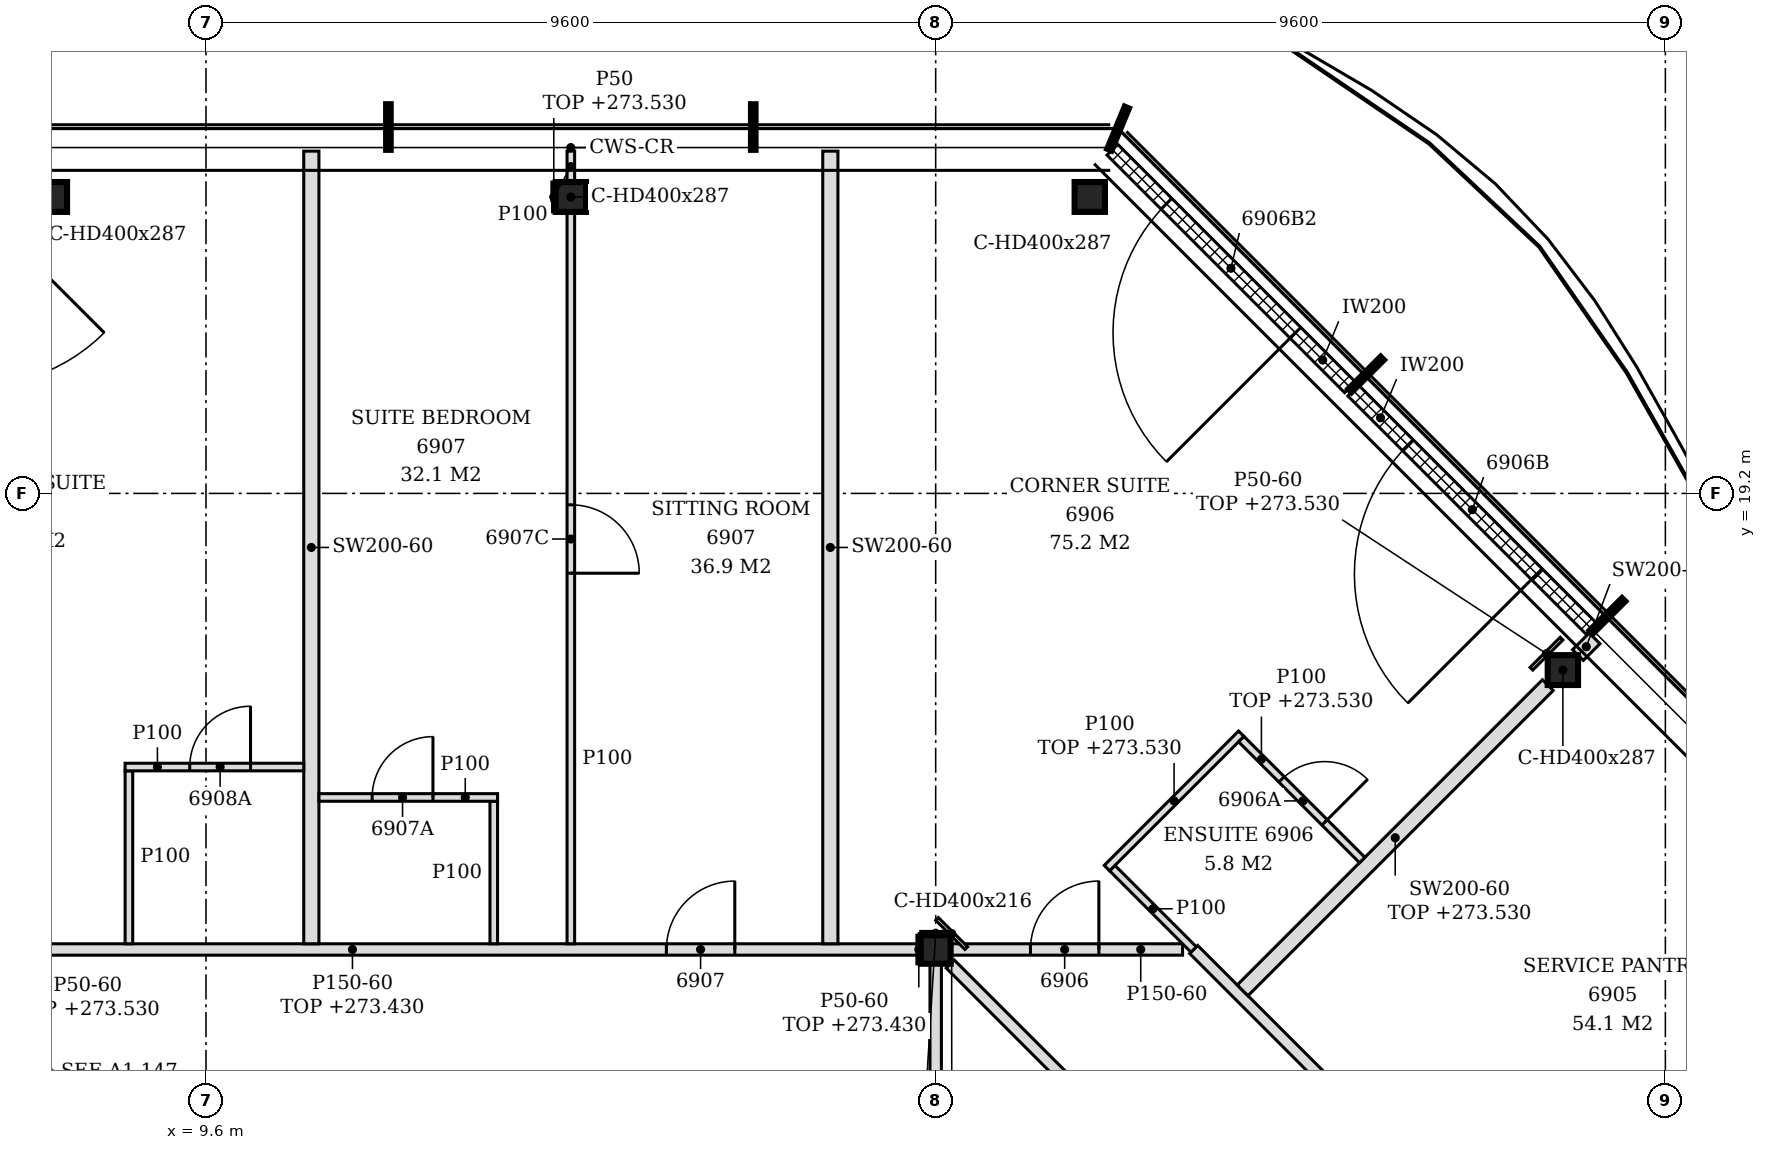
"""IFC4 building model, lengths in metres.
Left out: names, types, materials, properties, quantities, classifications, styles, units other than length and angle.
Written with IfcOpenShell. Run it as: python <this file> out.ifc"""

import sys

from ifc_helpers import new_model, si_unit, direction, frame, frame_2d, origin, origin_2d, place, context, subcontext, project, spatial, polyline, rectangle, i_section, outline, extrude, element, fill, save


model = new_model("IFC4")
c1 = context("Model", 3, precision=1e-05, world=origin(), true_north=direction((0.0, 1.0)))
c2 = subcontext(c1, "Body", "Model", "MODEL_VIEW")
j1 = project(units=[si_unit("LENGTHUNIT", "METRE"), si_unit("PLANEANGLEUNIT", "RADIAN")], contexts=[c1])
p1 = place(None, origin())
s1 = spatial("IfcSite", under=j1, at=p1, CompositionType="ELEMENT")
p2 = place(p1, origin())
s2 = spatial("IfcBuilding", under=s1, at=p2, CompositionType="ELEMENT")
p3 = place(p2, frame((0.0, 0.0, 270.6)))
s3 = spatial("IfcBuildingStorey", under=s2, at=p3, CompositionType="ELEMENT", Elevation=270.6)
for number, where, z_axis, x_axis in (
    (1, (27.451, 16.876, -0.15), (0.0, 0.0, 1.0), (1.0, 0.0, 0.0)),
    (2, (21.227, 23.1, -0.15), (0.0, 0.0, 1.0), (1.0, 0.0, 0.0)),
    (3, (14.4, 23.1, -0.15), (0.0, 0.0, 1.0), (1.0, 0.0, 0.0)),
    (4, (7.573, 23.1, -0.15), (0.0, 0.0, 1.0), (1.0, 0.0, 0.0)),
):
    element("IfcColumn", number, at=place(p3, frame(where, z_axis=z_axis, x_axis=x_axis)), inside=s3, PredefinedType="COLUMN", context=c2, shape_type="SweptSolid", body=[
        extrude(i_section(OverallWidth=0.399, OverallDepth=0.393, WebThickness=0.023, FlangeThickness=0.037, FilletRadius=0.015, at=origin_2d()), origin(), (0.0, 0.0, 1.0), 3.6),
    ])
p4 = place(p3, frame((19.2, 13.2, -0.15), z_axis=(0.0, 0.0, 1.0), x_axis=(1.0, 0.0, 0.0)))
e5 = element("IfcColumn", 5, at=p4, inside=s3, PredefinedType="COLUMN", context=c2, shape_type="SweptSolid", body=[
    extrude(i_section(OverallWidth=0.394, OverallDepth=0.375, WebThickness=0.017, FlangeThickness=0.028, FilletRadius=0.015, at=origin_2d()), origin(), (0.0, 0.0, 1.0), 3.6),
])
p5 = place(p3, frame((27.826, 17.42, 0.0), z_axis=(0.0, 0.0, 1.0), x_axis=(-0.707079231393, 0.707134329907, 0.0)))
e6 = element("IfcWall", 6, at=p5, inside=s3, PredefinedType="NOTDEFINED", context=c2, shape_type="SweptSolid", body=[
    extrude(rectangle(XDim=4.431, YDim=0.2, at=frame_2d((2.215, 0.0))), origin(), (0.0, 0.0, 1.0), 3.45),
])
p6 = place(p5, frame((1.015, 0.0, 0.0)))
e7 = element("IfcOpeningElement", 7, at=p6, cuts=e6, PredefinedType="OPENING", context=c2, shape_type="SweptSolid", body=[
    extrude(rectangle(XDim=2.4, YDim=2.4, at=frame_2d((1.2, 1.2))), frame((0.0, 0.11, 0.0), z_axis=(0.0, -1.0, 0.0), x_axis=(1.0, 0.0, 0.0)), (0.0, 0.0, 1.0), 0.22),
])
p7 = place(p3, frame((24.651, 20.596, 0.0), z_axis=(0.0, 0.0, 1.0), x_axis=(-0.707134392299, 0.707079168996, 0.0)))
e8 = element("IfcWall", 8, at=p7, inside=s3, PredefinedType="NOTDEFINED", context=c2, shape_type="SweptSolid", body=[
    extrude(rectangle(XDim=4.421, YDim=0.2, at=frame_2d((2.21, 0.0))), origin(), (0.0, 0.0, 1.0), 3.45),
])
p8 = place(p7, frame((1.015, 0.0, 0.0)))
e9 = element("IfcOpeningElement", 9, at=p8, cuts=e8, PredefinedType="OPENING", context=c2, shape_type="SweptSolid", body=[
    extrude(rectangle(XDim=2.4, YDim=2.4, at=frame_2d((1.2, 1.2))), frame((0.0, 0.11, 0.0), z_axis=(0.0, -1.0, 0.0), x_axis=(1.0, 0.0, 0.0)), (0.0, 0.0, 1.0), 0.22),
])
p9 = place(p3, frame((32.272, 0.128, 0.0), z_axis=(0.0, 0.0, 1.0), x_axis=(-0.707106781187, 0.707106781187, 0.0)))
e10 = element("IfcWall", 10, at=p9, inside=s3, PredefinedType="PARTITIONING", context=c2, shape_type="SweptSolid", body=[
    extrude(rectangle(XDim=18.215, YDim=0.15, at=frame_2d((9.107, 0.0))), origin(), (0.0, 0.0, 1.0), 2.88),
])
p10 = place(p9, frame((8.703, 0.0, 0.0)))
e11 = element("IfcOpeningElement", 11, at=p10, cuts=e10, PredefinedType="OPENING", context=c2, shape_type="SweptSolid", body=[
    extrude(rectangle(XDim=0.9, YDim=2.1, at=frame_2d((0.45, 1.05))), frame((0.0, 0.085, 0.0), z_axis=(0.0, -1.0, 0.0), x_axis=(1.0, 0.0, 0.0)), (0.0, 0.0, 1.0), 0.17),
])
p11 = place(p3, frame((34.672, 1.122, 0.0), z_axis=(0.0, 0.0, 1.0), x_axis=(-0.707113927758, 0.707099634543, 0.0)))
e12 = element("IfcWall", 12, at=p11, inside=s3, PredefinedType="PARTITIONING", context=c2, shape_type="SweptSolid", body=[
    extrude(rectangle(XDim=17.081, YDim=0.15, at=frame_2d((8.541, 0.0))), origin(), (0.0, 0.0, 1.0), 2.88),
])
p12 = place(p11, frame((5.454, 0.0, 0.0)))
e13 = element("IfcOpeningElement", 13, at=p12, cuts=e12, PredefinedType="OPENING", context=c2, shape_type="SweptSolid", body=[
    extrude(rectangle(XDim=0.9, YDim=2.1, at=frame_2d((0.45, 1.05))), frame((0.0, 0.085, 0.0), z_axis=(0.0, -1.0, 0.0), x_axis=(1.0, 0.0, 0.0)), (0.0, 0.0, 1.0), 0.17),
])
p13 = place(p11, frame((11.897, 0.0, 0.0)))
e14 = element("IfcOpeningElement", 14, at=p13, cuts=e12, PredefinedType="OPENING", context=c2, shape_type="SweptSolid", body=[
    extrude(rectangle(XDim=0.9, YDim=2.1, at=frame_2d((0.45, 1.05))), frame((0.0, 0.085, 0.0), z_axis=(0.0, -1.0, 0.0), x_axis=(1.0, 0.0, 0.0)), (0.0, 0.0, 1.0), 0.17),
])
p14 = place(p3, frame((19.2, 2.587, 0.0), z_axis=(0.0, 0.0, 1.0), x_axis=(0.0, 1.0, 0.0)))
e15 = element("IfcWall", 15, at=p14, inside=s3, PredefinedType="PARTITIONING", context=c2, shape_type="SweptSolid", body=[
    extrude(rectangle(XDim=10.425, YDim=0.15, at=frame_2d((5.212, 0.0))), origin(), (0.0, 0.0, 1.0), 2.83),
])
p15 = place(p3, frame((23.238, 12.662, 0.0), z_axis=(0.0, 0.0, 1.0), x_axis=(0.707128276734, 0.707085284986, 0.0)))
e16 = element("IfcWall", 16, at=p15, inside=s3, PredefinedType="PARTITIONING", context=c2, shape_type="SweptSolid", body=[
    extrude(rectangle(XDim=5.679, YDim=0.2, at=frame_2d((2.839, 0.0))), origin(), (0.0, 0.0, 1.0), 2.93),
])
p16 = place(p3, frame((7.397, 13.2, 0.0), z_axis=(0.0, 0.0, 1.0), x_axis=(1.0, 0.0, 0.0)))
e17 = element("IfcWall", 17, at=p16, inside=s3, PredefinedType="PARTITIONING", context=c2, shape_type="SweptSolid", body=[
    extrude(rectangle(XDim=11.606, YDim=0.15, at=frame_2d((5.803, 0.0))), origin(), (0.0, 0.0, 1.0), 2.83),
])
p17 = place(p16, frame((8.26, 0.0, 0.0)))
e18 = element("IfcOpeningElement", 18, at=p17, cuts=e17, PredefinedType="OPENING", context=c2, shape_type="SweptSolid", body=[
    extrude(rectangle(XDim=0.9, YDim=2.1, at=frame_2d((0.45, 1.05))), frame((0.0, 0.085, 0.0), z_axis=(0.0, -1.0, 0.0), x_axis=(1.0, 0.0, 0.0)), (0.0, 0.0, 1.0), 0.17),
])
p18 = place(p3, frame((19.397, 13.2, 0.0), z_axis=(0.0, 0.0, 1.0), x_axis=(1.0, 0.0, 0.0)))
e19 = element("IfcWall", 19, at=p18, inside=s3, PredefinedType="PARTITIONING", context=c2, shape_type="SweptSolid", body=[
    extrude(rectangle(XDim=3.051, YDim=0.15, at=frame_2d((1.526, 0.0))), origin(), (0.0, 0.0, 1.0), 3.45),
])
p19 = place(p18, frame((1.05, 0.0, 0.0)))
e20 = element("IfcOpeningElement", 20, at=p19, cuts=e19, PredefinedType="OPENING", context=c2, shape_type="SweptSolid", body=[
    extrude(rectangle(XDim=0.9, YDim=2.1, at=frame_2d((0.45, 1.05))), frame((0.0, 0.085, 0.0), z_axis=(0.0, -1.0, 0.0), x_axis=(1.0, 0.0, 0.0)), (0.0, 0.0, 1.0), 0.17),
])
p20 = place(p3, frame((22.594, 13.2, 0.0), z_axis=(0.0, 0.0, 1.0), x_axis=(-0.707106781187, 0.707106781187, 0.0)))
e21 = element("IfcWall", 21, at=p20, inside=s3, PredefinedType="PARTITIONING", context=c2, shape_type="SweptSolid", body=[
    extrude(rectangle(XDim=1.514, YDim=0.1, at=frame_2d((0.757, 0.0))), origin(), (0.0, 0.0, 1.0), 3.45),
])
p21 = place(p3, frame((8.586, 13.275, 0.0), z_axis=(0.0, 0.0, 1.0), x_axis=(0.0, 1.0, 0.0)))
e22 = element("IfcWall", 22, at=p21, inside=s3, PredefinedType="PARTITIONING", context=c2, shape_type="SweptSolid", body=[
    extrude(outline(polyline([(0.0, 0.0), (2.275, 0.0), (2.275, 3.45), (0.075, 3.45), (0.073, 2.83), (0.0, 2.83), (0.0, 0.0)])), frame((0.0, 0.05, 0.0), z_axis=(0.0, -1.0, 0.0), x_axis=(1.0, 0.0, 0.0)), (0.0, 0.0, 1.0), 0.1),
])
p22 = place(p3, frame((10.986, 13.275, 0.0), z_axis=(0.0, 0.0, 1.0), x_axis=(0.0, 1.0, 0.0)))
e23 = element("IfcWall", 23, at=p22, inside=s3, PredefinedType="PARTITIONING", context=c2, shape_type="SweptSolid", body=[
    extrude(outline(polyline([(0.0, 0.0), (10.428, 0.0), (10.428, 3.45), (9.975, 3.45), (9.973, 2.93), (9.675, 2.93), (9.673, 3.45), (6.03, 3.45), (6.028, 2.88), (5.82, 2.88), (5.818, 3.45), (0.075, 3.45), (0.073, 2.83), (0.0, 2.83), (0.0, 0.0)])), frame((0.0, 0.1, 0.0), z_axis=(0.0, -1.0, 0.0), x_axis=(1.0, 0.0, 0.0)), (0.0, 0.0, 1.0), 0.2),
])
p23 = place(p3, frame((13.386, 13.275, 0.0), z_axis=(0.0, 0.0, 1.0), x_axis=(0.0, 1.0, 0.0)))
e24 = element("IfcWall", 24, at=p23, inside=s3, PredefinedType="PARTITIONING", context=c2, shape_type="SweptSolid", body=[
    extrude(outline(polyline([(0.0, 0.0), (1.875, 0.0), (1.875, 3.45), (0.075, 3.45), (0.073, 2.83), (0.0, 2.83), (0.0, 0.0)])), frame((0.0, 0.05, 0.0), z_axis=(0.0, -1.0, 0.0), x_axis=(1.0, 0.0, 0.0)), (0.0, 0.0, 1.0), 0.1),
])
p24 = place(p3, frame((14.4, 13.275, 0.0), z_axis=(0.0, 0.0, 1.0), x_axis=(0.0, 1.0, 0.0)))
e25 = element("IfcWall", 25, at=p24, inside=s3, PredefinedType="PARTITIONING", context=c2, shape_type="SweptSolid", body=[
    extrude(outline(polyline([(0.0, 0.0), (9.629, 0.0), (9.628, 3.45), (6.03, 3.45), (6.028, 2.88), (5.82, 2.88), (5.818, 3.45), (0.075, 3.45), (0.073, 2.83), (0.0, 2.83), (0.0, 0.0)])), frame((0.0, 0.05, 0.0), z_axis=(0.0, -1.0, 0.0), x_axis=(1.0, 0.0, 0.0)), (0.0, 0.0, 1.0), 0.1),
])
p25 = place(p24, frame((4.875, 0.0, 0.0)))
e26 = element("IfcOpeningElement", 26, at=p25, cuts=e25, PredefinedType="OPENING", context=c2, shape_type="SweptSolid", body=[
    extrude(rectangle(XDim=0.9, YDim=2.1, at=frame_2d((0.45, 1.05))), frame((0.0, 0.06, 0.0), z_axis=(0.0, -1.0, 0.0), x_axis=(1.0, 0.0, 0.0)), (0.0, 0.0, 1.0), 0.12),
])
p26 = place(p3, frame((17.814, 13.275, 0.0), z_axis=(0.0, 0.0, 1.0), x_axis=(0.0, 1.0, 0.0)))
e27 = element("IfcWall", 27, at=p26, inside=s3, PredefinedType="PARTITIONING", context=c2, shape_type="SweptSolid", body=[
    extrude(outline(polyline([(0.0, 0.0), (10.428, 0.0), (10.428, 3.45), (9.975, 3.45), (9.973, 2.93), (9.675, 2.93), (9.673, 3.45), (6.03, 3.45), (6.028, 2.88), (5.82, 2.88), (5.818, 3.45), (0.075, 3.45), (0.073, 2.83), (0.0, 2.83), (0.0, 0.0)])), frame((0.0, 0.1, 0.0), z_axis=(0.0, -1.0, 0.0), x_axis=(1.0, 0.0, 0.0)), (0.0, 0.0, 1.0), 0.2),
])
p27 = place(p3, frame((21.453, 14.271, 0.0), z_axis=(0.0, 0.0, 1.0), x_axis=(0.707057949532, 0.707155609469, 0.0)))
e28 = element("IfcWall", 28, at=p27, inside=s3, PredefinedType="PARTITIONING", context=c2, shape_type="SweptSolid", body=[
    extrude(rectangle(XDim=2.5, YDim=0.1, at=frame_2d((1.25, 0.0))), origin(), (0.0, 0.0, 1.0), 2.93),
])
p28 = place(p3, frame((24.811, 14.377, 0.0), z_axis=(0.0, 0.0, 1.0), x_axis=(-0.707106781187, 0.707106781187, 0.0)))
e29 = element("IfcWall", 29, at=p28, inside=s3, PredefinedType="PARTITIONING", context=c2, shape_type="SweptSolid", body=[
    extrude(rectangle(XDim=2.25, YDim=0.1, at=frame_2d((1.125, 0.0))), origin(), (0.0, 0.0, 1.0), 2.93),
])
p29 = place(p28, frame((0.7, 0.0, 0.0)))
e30 = element("IfcOpeningElement", 30, at=p29, cuts=e29, PredefinedType="OPENING", context=c2, shape_type="SweptSolid", body=[
    extrude(rectangle(XDim=0.8, YDim=2.1, at=frame_2d((0.4, 1.05))), frame((0.0, 0.06, 0.0), z_axis=(0.0, -1.0, 0.0), x_axis=(1.0, 0.0, 0.0)), (0.0, 0.0, 1.0), 0.12),
])
p30 = place(p3, frame((11.086, 15.2, 0.0), z_axis=(0.0, 0.0, 1.0), x_axis=(1.0, 0.0, 0.0)))
e31 = element("IfcWall", 31, at=p30, inside=s3, PredefinedType="PARTITIONING", context=c2, shape_type="SweptSolid", body=[
    extrude(rectangle(XDim=2.35, YDim=0.1, at=frame_2d((1.175, 0.0))), origin(), (0.0, 0.0, 1.0), 3.45),
])
p31 = place(p30, frame((0.7, 0.0, 0.0)))
e32 = element("IfcOpeningElement", 32, at=p31, cuts=e31, PredefinedType="OPENING", context=c2, shape_type="SweptSolid", body=[
    extrude(rectangle(XDim=0.8, YDim=2.1, at=frame_2d((0.4, 1.05))), frame((0.0, 0.06, 0.0), z_axis=(0.0, -1.0, 0.0), x_axis=(1.0, 0.0, 0.0)), (0.0, 0.0, 1.0), 0.12),
])
p32 = place(p3, frame((8.536, 15.6, 0.0), z_axis=(0.0, 0.0, 1.0), x_axis=(1.0, 0.0, 0.0)))
e33 = element("IfcWall", 33, at=p32, inside=s3, PredefinedType="PARTITIONING", context=c2, shape_type="SweptSolid", body=[
    extrude(rectangle(XDim=2.35, YDim=0.1, at=frame_2d((1.175, 0.0))), origin(), (0.0, 0.0, 1.0), 3.45),
])
p33 = place(p32, frame((0.85, 0.0, 0.0)))
e34 = element("IfcOpeningElement", 34, at=p33, cuts=e33, PredefinedType="OPENING", context=c2, shape_type="SweptSolid", body=[
    extrude(rectangle(XDim=0.8, YDim=2.1, at=frame_2d((0.4, 1.05))), frame((0.0, 0.06, 0.0), z_axis=(0.0, -1.0, 0.0), x_axis=(1.0, 0.0, 0.0)), (0.0, 0.0, 1.0), 0.12),
])
p34 = place(p3, frame((27.65, 17.073, 0.0), z_axis=(0.0, 0.0, 1.0), x_axis=(0.707106781187, 0.707106781187, 0.0)))
e35 = element("IfcWall", 35, at=p34, inside=s3, PredefinedType="PARTITIONING", context=c2, shape_type="SweptSolid", body=[
    extrude(rectangle(XDim=0.31, YDim=0.2, at=frame_2d((0.155, 0.0))), origin(), (0.0, 0.0, 1.0), 3.45),
])
p35 = place(p3, frame((14.4, 23.296, 0.0), z_axis=(0.0, 0.0, 1.0), x_axis=(0.0, 1.0, 0.0)))
e36 = element("IfcWall", 36, at=p35, inside=s3, PredefinedType="PARTITIONING", context=c2, shape_type="SweptSolid", body=[
    extrude(rectangle(XDim=0.406, YDim=0.1, at=frame_2d((0.203, 0.0))), origin(), (0.0, 0.0, 1.0), 3.45),
])
p36 = place(p3, frame((18.978, 13.012, 0.0), z_axis=(0.0, 0.0, 1.0), x_axis=(0.0, 1.0, 0.0)))
e37 = element("IfcWall", 37, at=p36, inside=s3, PredefinedType="PARTITIONING", context=c2, shape_type="SweptSolid", body=[
    extrude(rectangle(XDim=0.375, YDim=0.05, at=frame_2d((0.188, 0.0))), origin(), (0.0, 0.0, 1.0), 2.83),
])
p37 = place(p3, frame((19.602, 13.218, 0.0), z_axis=(0.0, 0.0, 1.0), x_axis=(-0.707106781187, 0.707106781187, 0.0)))
e38 = element("IfcWall", 38, at=p37, inside=s3, PredefinedType="PARTITIONING", context=c2, shape_type="SweptSolid", body=[
    extrude(rectangle(XDim=0.544, YDim=0.05, at=frame_2d((0.272, 0.0))), origin(), (0.0, 0.0, 1.0), 2.93),
])
p38 = place(p3, frame((27.038, 16.893, 0.0), z_axis=(0.0, 0.0, 1.0), x_axis=(0.707106781187, 0.707106781187, 0.0)))
e39 = element("IfcWall", 39, at=p38, inside=s3, PredefinedType="PARTITIONING", context=c2, shape_type="SweptSolid", body=[
    extrude(rectangle(XDim=0.56, YDim=0.05, at=frame_2d((0.28, 0.0))), origin(), (0.0, 0.0, 1.0), 2.93),
])
p39 = place(p3, frame((19.003, 13.413, 0.0), z_axis=(0.0, 0.0, 1.0), x_axis=(1.0, 0.0, 0.0)))
e40 = element("IfcWall", 40, at=p39, inside=s3, PredefinedType="PARTITIONING", context=c2, shape_type="SweptSolid", body=[
    extrude(rectangle(XDim=0.394, YDim=0.05, at=frame_2d((0.197, 0.0))), origin(), (0.0, 0.0, 1.0), 2.93),
])
p40 = place(p3, frame((14.176, 22.904, 0.0), z_axis=(0.0, 0.0, 1.0), x_axis=(0.0, 1.0, 0.0)))
e41 = element("IfcWall", 41, at=p40, inside=s3, PredefinedType="PARTITIONING", context=c2, shape_type="SweptSolid", body=[
    extrude(rectangle(XDim=0.393, YDim=0.05, at=frame_2d((0.196, 0.0))), origin(), (0.0, 0.0, 1.0), 2.93),
])
p41 = place(p6, origin())
e42 = element("IfcDoor", 42, at=p41, inside=s3, OperationType="SINGLE_SWING_LEFT", PredefinedType="DOOR", context=c2, shape_type="SweptSolid", body=[
    extrude(rectangle(XDim=2.4, YDim=2.4, at=frame_2d((1.2, 1.2))), frame((0.0, 0.025, 0.0), z_axis=(0.0, -1.0, 0.0), x_axis=(1.0, 0.0, 0.0)), (0.0, 0.0, 1.0), 0.05),
])
fill(e7, e42)
p42 = place(p8, origin())
e43 = element("IfcDoor", 43, at=p42, inside=s3, OperationType="SINGLE_SWING_LEFT", PredefinedType="DOOR", context=c2, shape_type="SweptSolid", body=[
    extrude(rectangle(XDim=2.4, YDim=2.4, at=frame_2d((1.2, 1.2))), frame((0.0, 0.025, 0.0), z_axis=(0.0, -1.0, 0.0), x_axis=(1.0, 0.0, 0.0)), (0.0, 0.0, 1.0), 0.05),
])
fill(e9, e43)
p43 = place(p19, origin())
e44 = element("IfcDoor", 44, at=p43, inside=s3, OperationType="SINGLE_SWING_RIGHT", PredefinedType="DOOR", context=c2, shape_type="SweptSolid", body=[
    extrude(rectangle(XDim=0.9, YDim=2.1, at=frame_2d((0.45, 1.05))), frame((0.0, 0.025, 0.0), z_axis=(0.0, -1.0, 0.0), x_axis=(1.0, 0.0, 0.0)), (0.0, 0.0, 1.0), 0.05),
])
fill(e20, e44)
p44 = place(p29, frame((0.8, 0.0, 0.0), z_axis=(0.0, 0.0, 1.0), x_axis=(-1.0, 0.0, 0.0)))
e45 = element("IfcDoor", 45, at=p44, inside=s3, OperationType="SINGLE_SWING_RIGHT", PredefinedType="DOOR", context=c2, shape_type="SweptSolid", body=[
    extrude(rectangle(XDim=0.8, YDim=2.1, at=frame_2d((0.4, 1.05))), frame((0.0, 0.025, 0.0), z_axis=(0.0, -1.0, 0.0), x_axis=(1.0, 0.0, 0.0)), (0.0, 0.0, 1.0), 0.05),
])
fill(e30, e45)
p45 = place(p17, origin())
e46 = element("IfcDoor", 46, at=p45, inside=s3, OperationType="SINGLE_SWING_RIGHT", PredefinedType="DOOR", context=c2, shape_type="SweptSolid", body=[
    extrude(rectangle(XDim=0.9, YDim=2.1, at=frame_2d((0.45, 1.05))), frame((0.0, 0.025, 0.0), z_axis=(0.0, -1.0, 0.0), x_axis=(1.0, 0.0, 0.0)), (0.0, 0.0, 1.0), 0.05),
])
fill(e18, e46)
p46 = place(p25, frame((0.9, 0.0, 0.0), z_axis=(0.0, 0.0, 1.0), x_axis=(-1.0, 0.0, 0.0)))
e47 = element("IfcDoor", 47, at=p46, inside=s3, OperationType="SINGLE_SWING_RIGHT", PredefinedType="DOOR", context=c2, shape_type="SweptSolid", body=[
    extrude(rectangle(XDim=0.9, YDim=2.1, at=frame_2d((0.45, 1.05))), frame((0.0, 0.025, 0.0), z_axis=(0.0, -1.0, 0.0), x_axis=(1.0, 0.0, 0.0)), (0.0, 0.0, 1.0), 0.05),
])
fill(e26, e47)
p47 = place(p31, origin())
e48 = element("IfcDoor", 48, at=p47, inside=s3, OperationType="SINGLE_SWING_RIGHT", PredefinedType="DOOR", context=c2, shape_type="SweptSolid", body=[
    extrude(rectangle(XDim=0.8, YDim=2.1, at=frame_2d((0.4, 1.05))), frame((0.0, 0.025, 0.0), z_axis=(0.0, -1.0, 0.0), x_axis=(1.0, 0.0, 0.0)), (0.0, 0.0, 1.0), 0.05),
])
fill(e32, e48)
p48 = place(p33, origin())
e49 = element("IfcDoor", 49, at=p48, inside=s3, OperationType="SINGLE_SWING_RIGHT", PredefinedType="DOOR", context=c2, shape_type="SweptSolid", body=[
    extrude(rectangle(XDim=0.8, YDim=2.1, at=frame_2d((0.4, 1.05))), frame((0.0, 0.025, 0.0), z_axis=(0.0, -1.0, 0.0), x_axis=(1.0, 0.0, 0.0)), (0.0, 0.0, 1.0), 0.05),
])
fill(e34, e49)
save(model, sys.argv[1])
